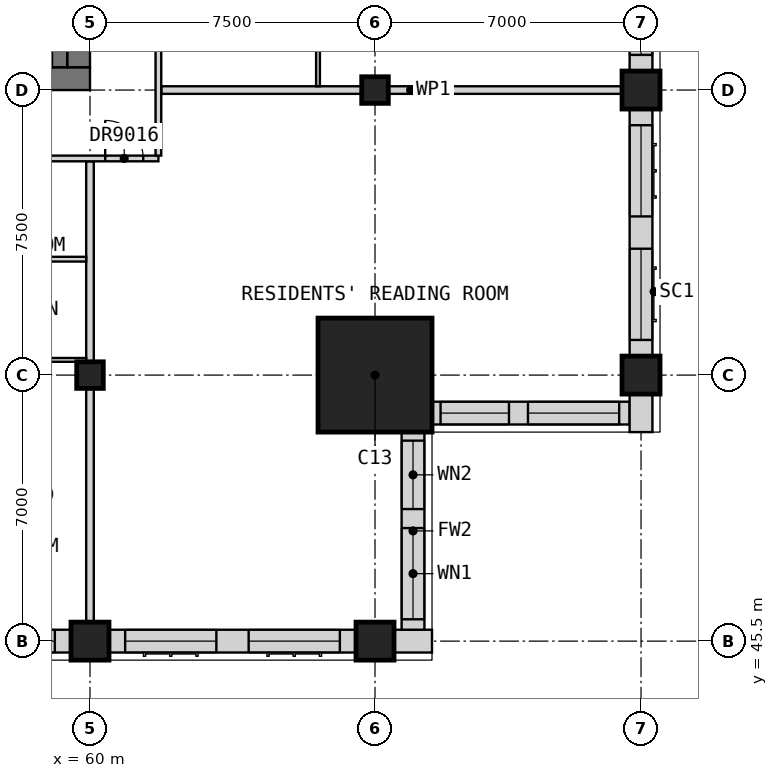
"""IFC4 building model, lengths in metres.
Left out: names, types, materials, properties, quantities, classifications, styles, units other than length and angle.
Written with IfcOpenShell. Run it as: python <this file> out.ifc"""

import sys

from ifc_helpers import new_model, si_unit, direction, frame, frame_2d, origin, origin_2d, place, context, subcontext, project, spatial, rectangle, extrude, element, fill, save


model = new_model("IFC4")
c1 = context("Model", 3, precision=1e-05, world=origin(), true_north=direction((0.0, 1.0)))
c2 = subcontext(c1, "Body", "Model", "MODEL_VIEW")
j1 = project(units=[si_unit("LENGTHUNIT", "METRE"), si_unit("PLANEANGLEUNIT", "RADIAN")], contexts=[c1])
p1 = place(None, origin())
s1 = spatial("IfcSite", under=j1, at=p1, CompositionType="ELEMENT")
p2 = place(p1, origin())
s2 = spatial("IfcBuilding", under=s1, at=p2, CompositionType="ELEMENT")
p3 = place(p2, frame((0.0, 0.0, 269.7)))
s3 = spatial("IfcBuildingStorey", under=s2, at=p3, CompositionType="ELEMENT", Elevation=269.7)
p4 = place(p3, frame((60.0, 45.5, 0.0), z_axis=(0.0, 0.0, 1.0), x_axis=(1.0, 0.0, 0.0)))
e1 = element("IfcColumn", 1, at=p4, inside=s3, PredefinedType="COLUMN", context=c2, shape_type="SweptSolid", body=[
    extrude(rectangle(XDim=1.0, YDim=1.0, at=origin_2d()), origin(), (0.0, 0.0, 1.0), 3.5),
])
p5 = place(p3, frame((60.0, 52.5, 0.0), z_axis=(0.0, 0.0, 1.0), x_axis=(1.0, 0.0, 0.0)))
e2 = element("IfcColumn", 2, at=p5, inside=s3, PredefinedType="COLUMN", context=c2, shape_type="SweptSolid", body=[
    extrude(rectangle(XDim=0.7, YDim=0.7, at=origin_2d()), origin(), (0.0, 0.0, 1.0), 3.5),
])
p6 = place(p3, frame((67.5, 45.5, 0.0), z_axis=(0.0, 0.0, 1.0), x_axis=(1.0, 0.0, 0.0)))
e3 = element("IfcColumn", 3, at=p6, inside=s3, PredefinedType="COLUMN", context=c2, shape_type="SweptSolid", body=[
    extrude(rectangle(XDim=1.0, YDim=1.0, at=origin_2d()), origin(), (0.0, 0.0, 1.0), 3.5),
])
p7 = place(p3, frame((67.5, 60.0, 0.0), z_axis=(0.0, 0.0, 1.0), x_axis=(1.0, 0.0, 0.0)))
e4 = element("IfcColumn", 4, at=p7, inside=s3, PredefinedType="COLUMN", context=c2, shape_type="SweptSolid", body=[
    extrude(rectangle(XDim=0.7, YDim=0.7, at=origin_2d()), origin(), (0.0, 0.0, 1.0), 3.5),
])
for number, where, z_axis, x_axis in (
    (5, (74.5, 52.5, 0.0), (0.0, 0.0, 1.0), (1.0, 0.0, 0.0)),
    (6, (74.5, 60.0, 0.0), (0.0, 0.0, 1.0), (1.0, 0.0, 0.0)),
):
    element("IfcColumn", number, at=place(p3, frame(where, z_axis=z_axis, x_axis=x_axis)), inside=s3, PredefinedType="COLUMN", context=c2, shape_type="SweptSolid", body=[
        extrude(rectangle(XDim=1.0, YDim=1.0, at=origin_2d()), origin(), (0.0, 0.0, 1.0), 3.5),
    ])
p8 = place(p3, frame((67.5, 52.5, 0.0), z_axis=(0.0, 0.0, 1.0), x_axis=(1.0, 0.0, 0.0)))
e7 = element("IfcColumn", 7, at=p8, inside=s3, PredefinedType="COLUMN", context=c2, shape_type="SweptSolid", body=[
    extrude(rectangle(XDim=3.0, YDim=3.0, at=origin_2d()), origin(), (0.0, 0.0, 1.0), 3.5),
])
p9 = place(p3, frame((30.0, 60.3, 0.0), z_axis=(0.0, 0.0, 1.0), x_axis=(1.0, 0.0, 0.0)))
e8 = element("IfcWall", 8, at=p9, inside=s3, PredefinedType="SHEAR", context=c2, shape_type="SweptSolid", body=[
    extrude(rectangle(XDim=30.0, YDim=0.6, at=frame_2d((15.0, 0.0))), origin(), (0.0, 0.0, 1.0), 3.5),
])
p10 = place(p9, frame((21.9, 0.0, 0.0)))
e9 = element("IfcOpeningElement", 9, at=p10, cuts=e8, PredefinedType="OPENING", context=c2, shape_type="SweptSolid", body=[
    extrude(rectangle(XDim=1.8, YDim=2.1, at=frame_2d((0.9, 1.05))), frame((0.0, 0.31, 0.0), z_axis=(0.0, -1.0, 0.0), x_axis=(1.0, 0.0, 0.0)), (0.0, 0.0, 1.0), 0.62),
])
p11 = place(p9, frame((26.5, 0.0, 0.0)))
e10 = element("IfcOpeningElement", 10, at=p11, cuts=e8, PredefinedType="OPENING", context=c2, shape_type="SweptSolid", body=[
    extrude(rectangle(XDim=1.2, YDim=2.1, at=frame_2d((0.6, 1.05))), frame((0.0, 0.31, 0.0), z_axis=(0.0, -1.0, 0.0), x_axis=(1.0, 0.0, 0.0)), (0.0, 0.0, 1.0), 0.62),
])
p12 = place(p3, frame((59.7, 60.6, 0.0), z_axis=(0.0, 0.0, 1.0), x_axis=(0.0, 1.0, 0.0)))
e11 = element("IfcWall", 11, at=p12, inside=s3, PredefinedType="SHEAR", context=c2, shape_type="SweptSolid", body=[
    extrude(rectangle(XDim=21.3, YDim=0.6, at=frame_2d((10.65, 0.0))), origin(), (0.0, 0.0, 1.0), 3.5),
])
p13 = place(p12, frame((14.9, 0.0, 0.0)))
e12 = element("IfcOpeningElement", 12, at=p13, cuts=e11, PredefinedType="OPENING", context=c2, shape_type="SweptSolid", body=[
    extrude(rectangle(XDim=1.8, YDim=2.1, at=frame_2d((0.9, 1.05))), frame((0.0, 0.31, 0.0), z_axis=(0.0, -1.0, 0.0), x_axis=(1.0, 0.0, 0.0)), (0.0, 0.0, 1.0), 0.62),
])
p14 = place(p3, frame((53.0, 45.5, 0.0), z_axis=(0.0, 0.0, 1.0), x_axis=(1.0, 0.0, 0.0)))
e13 = element("IfcWall", 13, at=p14, inside=s3, PredefinedType="SOLIDWALL", context=c2, shape_type="SweptSolid", body=[
    extrude(rectangle(XDim=6.5, YDim=0.6, at=frame_2d((3.25, 0.0))), origin(), (0.0, 0.0, 1.0), 2.75),
])
p15 = place(p14, frame((0.425, 0.0, 0.8)))
e14 = element("IfcOpeningElement", 14, at=p15, cuts=e13, PredefinedType="OPENING", context=c2, shape_type="SweptSolid", body=[
    extrude(rectangle(XDim=2.4, YDim=1.8, at=frame_2d((1.2, 0.9))), frame((0.0, 0.31, 0.0), z_axis=(0.0, -1.0, 0.0), x_axis=(1.0, 0.0, 0.0)), (0.0, 0.0, 1.0), 0.62),
])
p16 = place(p14, frame((3.675, 0.0, 0.8)))
e15 = element("IfcOpeningElement", 15, at=p16, cuts=e13, PredefinedType="OPENING", context=c2, shape_type="SweptSolid", body=[
    extrude(rectangle(XDim=2.4, YDim=1.8, at=frame_2d((1.2, 0.9))), frame((0.0, 0.31, 0.0), z_axis=(0.0, -1.0, 0.0), x_axis=(1.0, 0.0, 0.0)), (0.0, 0.0, 1.0), 0.62),
])
p17 = place(p3, frame((60.5, 45.5, 0.0), z_axis=(0.0, 0.0, 1.0), x_axis=(1.0, 0.0, 0.0)))
e16 = element("IfcWall", 16, at=p17, inside=s3, PredefinedType="SOLIDWALL", context=c2, shape_type="SweptSolid", body=[
    extrude(rectangle(XDim=6.5, YDim=0.6, at=frame_2d((3.25, 0.0))), origin(), (0.0, 0.0, 1.0), 2.75),
])
p18 = place(p17, frame((0.425, 0.0, 0.8)))
e17 = element("IfcOpeningElement", 17, at=p18, cuts=e16, PredefinedType="OPENING", context=c2, shape_type="SweptSolid", body=[
    extrude(rectangle(XDim=2.4, YDim=1.8, at=frame_2d((1.2, 0.9))), frame((0.0, 0.31, 0.0), z_axis=(0.0, -1.0, 0.0), x_axis=(1.0, 0.0, 0.0)), (0.0, 0.0, 1.0), 0.62),
])
p19 = place(p17, frame((3.675, 0.0, 0.8)))
e18 = element("IfcOpeningElement", 18, at=p19, cuts=e16, PredefinedType="OPENING", context=c2, shape_type="SweptSolid", body=[
    extrude(rectangle(XDim=2.4, YDim=1.8, at=frame_2d((1.2, 0.9))), frame((0.0, 0.31, 0.0), z_axis=(0.0, -1.0, 0.0), x_axis=(1.0, 0.0, 0.0)), (0.0, 0.0, 1.0), 0.62),
])
p20 = place(p3, frame((68.0, 45.5, 0.0), z_axis=(0.0, 0.0, 1.0), x_axis=(1.0, 0.0, 0.0)))
e19 = element("IfcWall", 19, at=p20, inside=s3, PredefinedType="SOLIDWALL", context=c2, shape_type="SweptSolid", body=[
    extrude(rectangle(XDim=1.0, YDim=0.6, at=frame_2d((0.5, 0.0))), origin(), (0.0, 0.0, 1.0), 3.25),
])
p21 = place(p3, frame((68.5, 45.8, 0.0), z_axis=(0.0, 0.0, 1.0), x_axis=(0.0, 1.0, 0.0)))
e20 = element("IfcWall", 20, at=p21, inside=s3, PredefinedType="SOLIDWALL", context=c2, shape_type="SweptSolid", body=[
    extrude(rectangle(XDim=5.2, YDim=0.6, at=frame_2d((2.6, 0.0))), origin(), (0.0, 0.0, 1.0), 3.25),
])
p22 = place(p21, frame((0.275, 0.0, 0.8)))
e21 = element("IfcOpeningElement", 21, at=p22, cuts=e20, PredefinedType="OPENING", context=c2, shape_type="SweptSolid", body=[
    extrude(rectangle(XDim=2.4, YDim=1.8, at=frame_2d((1.2, 0.9))), frame((0.0, 0.31, 0.0), z_axis=(0.0, -1.0, 0.0), x_axis=(1.0, 0.0, 0.0)), (0.0, 0.0, 1.0), 0.62),
])
p23 = place(p21, frame((3.175, 0.0, 0.8)))
e22 = element("IfcOpeningElement", 22, at=p23, cuts=e20, PredefinedType="OPENING", context=c2, shape_type="SweptSolid", body=[
    extrude(rectangle(XDim=1.8, YDim=1.8, at=frame_2d((0.9, 0.9))), frame((0.0, 0.31, 0.0), z_axis=(0.0, -1.0, 0.0), x_axis=(1.0, 0.0, 0.0)), (0.0, 0.0, 1.0), 0.62),
])
p24 = place(p3, frame((69.0, 51.5, 0.0), z_axis=(0.0, 0.0, 1.0), x_axis=(1.0, 0.0, 0.0)))
e23 = element("IfcWall", 23, at=p24, inside=s3, PredefinedType="SOLIDWALL", context=c2, shape_type="SweptSolid", body=[
    extrude(rectangle(XDim=5.2, YDim=0.6, at=frame_2d((2.6, 0.0))), origin(), (0.0, 0.0, 1.0), 3.25),
])
p25 = place(p24, frame((0.225, 0.0, 0.8)))
e24 = element("IfcOpeningElement", 24, at=p25, cuts=e23, PredefinedType="OPENING", context=c2, shape_type="SweptSolid", body=[
    extrude(rectangle(XDim=1.8, YDim=1.8, at=frame_2d((0.9, 0.9))), frame((0.0, 0.31, 0.0), z_axis=(0.0, -1.0, 0.0), x_axis=(1.0, 0.0, 0.0)), (0.0, 0.0, 1.0), 0.62),
])
p26 = place(p24, frame((2.525, 0.0, 0.8)))
e25 = element("IfcOpeningElement", 25, at=p26, cuts=e23, PredefinedType="OPENING", context=c2, shape_type="SweptSolid", body=[
    extrude(rectangle(XDim=2.4, YDim=1.8, at=frame_2d((1.2, 0.9))), frame((0.0, 0.31, 0.0), z_axis=(0.0, -1.0, 0.0), x_axis=(1.0, 0.0, 0.0)), (0.0, 0.0, 1.0), 0.62),
])
p27 = place(p3, frame((74.5, 51.0, 0.0), z_axis=(0.0, 0.0, 1.0), x_axis=(0.0, 1.0, 0.0)))
e26 = element("IfcWall", 26, at=p27, inside=s3, PredefinedType="SOLIDWALL", context=c2, shape_type="SweptSolid", body=[
    extrude(rectangle(XDim=1.0, YDim=0.6, at=frame_2d((0.5, 0.0))), origin(), (0.0, 0.0, 1.0), 3.25),
])
p28 = place(p3, frame((74.5, 53.0, 0.0), z_axis=(0.0, 0.0, 1.0), x_axis=(0.0, 1.0, 0.0)))
e27 = element("IfcWall", 27, at=p28, inside=s3, PredefinedType="SOLIDWALL", context=c2, shape_type="SweptSolid", body=[
    extrude(rectangle(XDim=6.5, YDim=0.6, at=frame_2d((3.25, 0.0))), origin(), (0.0, 0.0, 1.0), 2.75),
])
p29 = place(p28, frame((0.425, 0.0, 0.8)))
e28 = element("IfcOpeningElement", 28, at=p29, cuts=e27, PredefinedType="OPENING", context=c2, shape_type="SweptSolid", body=[
    extrude(rectangle(XDim=2.4, YDim=1.8, at=frame_2d((1.2, 0.9))), frame((0.0, 0.31, 0.0), z_axis=(0.0, -1.0, 0.0), x_axis=(1.0, 0.0, 0.0)), (0.0, 0.0, 1.0), 0.62),
])
p30 = place(p28, frame((3.675, 0.0, 0.8)))
e29 = element("IfcOpeningElement", 29, at=p30, cuts=e27, PredefinedType="OPENING", context=c2, shape_type="SweptSolid", body=[
    extrude(rectangle(XDim=2.4, YDim=1.8, at=frame_2d((1.2, 0.9))), frame((0.0, 0.31, 0.0), z_axis=(0.0, -1.0, 0.0), x_axis=(1.0, 0.0, 0.0)), (0.0, 0.0, 1.0), 0.62),
])
p31 = place(p3, frame((74.5, 60.5, 0.0), z_axis=(0.0, 0.0, 1.0), x_axis=(0.0, 1.0, 0.0)))
e30 = element("IfcWall", 30, at=p31, inside=s3, PredefinedType="SOLIDWALL", context=c2, shape_type="SweptSolid", body=[
    extrude(rectangle(XDim=6.5, YDim=0.6, at=frame_2d((3.25, 0.0))), origin(), (0.0, 0.0, 1.0), 2.75),
])
p32 = place(p31, frame((0.425, 0.0, 0.8)))
e31 = element("IfcOpeningElement", 31, at=p32, cuts=e30, PredefinedType="OPENING", context=c2, shape_type="SweptSolid", body=[
    extrude(rectangle(XDim=2.4, YDim=1.8, at=frame_2d((1.2, 0.9))), frame((0.0, 0.31, 0.0), z_axis=(0.0, -1.0, 0.0), x_axis=(1.0, 0.0, 0.0)), (0.0, 0.0, 1.0), 0.62),
])
p33 = place(p31, frame((3.675, 0.0, 0.8)))
e32 = element("IfcOpeningElement", 32, at=p33, cuts=e30, PredefinedType="OPENING", context=c2, shape_type="SweptSolid", body=[
    extrude(rectangle(XDim=2.4, YDim=1.8, at=frame_2d((1.2, 0.9))), frame((0.0, 0.31, 0.0), z_axis=(0.0, -1.0, 0.0), x_axis=(1.0, 0.0, 0.0)), (0.0, 0.0, 1.0), 0.62),
])
p34 = place(p3, frame((59.2, 60.6, 0.0), z_axis=(0.0, 0.0, 1.0), x_axis=(0.0, 1.0, 0.0)))
e33 = element("IfcWall", 33, at=p34, inside=s3, PredefinedType="SOLIDWALL", context=c2, shape_type="SweptSolid", body=[
    extrude(rectangle(XDim=7.9, YDim=0.4, at=frame_2d((3.95, 0.0))), origin(), (0.0, 0.0, 1.0), 3.25),
])
for number, where, z_axis, x_axis in (
    (34, (61.875, 60.0, 0.0), (0.0, 0.0, 1.0), (1.0, 0.0, 0.0)),
    (35, (60.0, 45.0, 0.0), (0.0, 0.0, 1.0), (0.0, 1.0, 0.0)),
):
    element("IfcWall", number, at=place(p3, frame(where, z_axis=z_axis, x_axis=x_axis)), inside=s3, PredefinedType="PARTITIONING", context=c2, shape_type="SweptSolid", body=[
        extrude(rectangle(XDim=13.125, YDim=0.2, at=frame_2d((6.562, 0.0))), origin(), (0.0, 0.0, 1.0), 3.25),
    ])
p35 = place(p3, frame((33.75, 58.2, 0.0), z_axis=(0.0, 0.0, 1.0), x_axis=(1.0, 0.0, 0.0)))
e36 = element("IfcWall", 36, at=p35, inside=s3, PredefinedType="PARTITIONING", context=c2, shape_type="SweptSolid", body=[
    extrude(rectangle(XDim=28.05, YDim=0.15, at=frame_2d((14.025, 0.0))), origin(), (0.0, 0.0, 1.0), 3.25),
])
p36 = place(p35, frame((3.25, 0.0, 0.0)))
e37 = element("IfcOpeningElement", 37, at=p36, cuts=e36, PredefinedType="OPENING", context=c2, shape_type="SweptSolid", body=[
    extrude(rectangle(XDim=1.0, YDim=2.1, at=frame_2d((0.5, 1.05))), frame((0.0, 0.085, 0.0), z_axis=(0.0, -1.0, 0.0), x_axis=(1.0, 0.0, 0.0)), (0.0, 0.0, 1.0), 0.17),
])
p37 = place(p35, frame((8.925, 0.0, 0.0)))
e38 = element("IfcOpeningElement", 38, at=p37, cuts=e36, PredefinedType="OPENING", context=c2, shape_type="SweptSolid", body=[
    extrude(rectangle(XDim=0.9, YDim=2.1, at=frame_2d((0.45, 1.05))), frame((0.0, 0.085, 0.0), z_axis=(0.0, -1.0, 0.0), x_axis=(1.0, 0.0, 0.0)), (0.0, 0.0, 1.0), 0.17),
])
p38 = place(p35, frame((20.175, 0.0, 0.0)))
e39 = element("IfcOpeningElement", 39, at=p38, cuts=e36, PredefinedType="OPENING", context=c2, shape_type="SweptSolid", body=[
    extrude(rectangle(XDim=0.9, YDim=2.1, at=frame_2d((0.45, 1.05))), frame((0.0, 0.085, 0.0), z_axis=(0.0, -1.0, 0.0), x_axis=(1.0, 0.0, 0.0)), (0.0, 0.0, 1.0), 0.17),
])
p39 = place(p35, frame((26.65, 0.0, 0.0)))
e40 = element("IfcOpeningElement", 40, at=p39, cuts=e36, PredefinedType="OPENING", context=c2, shape_type="SweptSolid", body=[
    extrude(rectangle(XDim=1.0, YDim=2.1, at=frame_2d((0.5, 1.05))), frame((0.0, 0.085, 0.0), z_axis=(0.0, -1.0, 0.0), x_axis=(1.0, 0.0, 0.0)), (0.0, 0.0, 1.0), 0.17),
])
p40 = place(p3, frame((61.8, 58.275, 0.0), z_axis=(0.0, 0.0, 1.0), x_axis=(0.0, 1.0, 0.0)))
e41 = element("IfcWall", 41, at=p40, inside=s3, PredefinedType="PARTITIONING", context=c2, shape_type="SweptSolid", body=[
    extrude(rectangle(XDim=25.95, YDim=0.15, at=frame_2d((12.975, 0.0))), origin(), (0.0, 0.0, 1.0), 3.25),
])
p41 = place(p40, frame((3.15, 0.0, 0.0)))
e42 = element("IfcOpeningElement", 42, at=p41, cuts=e41, PredefinedType="OPENING", context=c2, shape_type="SweptSolid", body=[
    extrude(rectangle(XDim=0.9, YDim=2.1, at=frame_2d((0.45, 1.05))), frame((0.0, 0.085, 0.0), z_axis=(0.0, -1.0, 0.0), x_axis=(1.0, 0.0, 0.0)), (0.0, 0.0, 1.0), 0.17),
])
p42 = place(p40, frame((18.15, 0.0, 0.0)))
e43 = element("IfcOpeningElement", 43, at=p42, cuts=e41, PredefinedType="OPENING", context=c2, shape_type="SweptSolid", body=[
    extrude(rectangle(XDim=0.9, YDim=2.1, at=frame_2d((0.45, 1.05))), frame((0.0, 0.085, 0.0), z_axis=(0.0, -1.0, 0.0), x_axis=(1.0, 0.0, 0.0)), (0.0, 0.0, 1.0), 0.17),
])
p43 = place(p3, frame((41.35, 52.9, 0.0), z_axis=(0.0, 0.0, 1.0), x_axis=(1.0, 0.0, 0.0)))
e44 = element("IfcWall", 44, at=p43, inside=s3, PredefinedType="PARTITIONING", context=c2, shape_type="SweptSolid", body=[
    extrude(rectangle(XDim=18.55, YDim=0.1, at=frame_2d((9.275, 0.0))), origin(), (0.0, 0.0, 1.0), 3.25),
])
p44 = place(p43, frame((1.325, 0.0, 0.0)))
e45 = element("IfcOpeningElement", 45, at=p44, cuts=e44, PredefinedType="OPENING", context=c2, shape_type="SweptSolid", body=[
    extrude(rectangle(XDim=0.9, YDim=2.1, at=frame_2d((0.45, 1.05))), frame((0.0, 0.06, 0.0), z_axis=(0.0, -1.0, 0.0), x_axis=(1.0, 0.0, 0.0)), (0.0, 0.0, 1.0), 0.12),
])
p45 = place(p43, frame((8.825, 0.0, 0.0)))
e46 = element("IfcOpeningElement", 46, at=p45, cuts=e44, PredefinedType="OPENING", context=c2, shape_type="SweptSolid", body=[
    extrude(rectangle(XDim=0.9, YDim=2.1, at=frame_2d((0.45, 1.05))), frame((0.0, 0.06, 0.0), z_axis=(0.0, -1.0, 0.0), x_axis=(1.0, 0.0, 0.0)), (0.0, 0.0, 1.0), 0.12),
])
p46 = place(p43, frame((12.575, 0.0, 0.0)))
e47 = element("IfcOpeningElement", 47, at=p46, cuts=e44, PredefinedType="OPENING", context=c2, shape_type="SweptSolid", body=[
    extrude(rectangle(XDim=0.9, YDim=2.1, at=frame_2d((0.45, 1.05))), frame((0.0, 0.06, 0.0), z_axis=(0.0, -1.0, 0.0), x_axis=(1.0, 0.0, 0.0)), (0.0, 0.0, 1.0), 0.12),
])
p47 = place(p3, frame((66.0, 60.1, 0.0), z_axis=(0.0, 0.0, 1.0), x_axis=(0.0, 1.0, 0.0)))
e48 = element("IfcWall", 48, at=p47, inside=s3, PredefinedType="PARTITIONING", context=c2, shape_type="SweptSolid", body=[
    extrude(rectangle(XDim=22.3, YDim=0.1, at=frame_2d((11.15, 0.0))), origin(), (0.0, 0.0, 1.0), 3.25),
])
p48 = place(p47, frame((1.325, 0.0, 0.0)))
e49 = element("IfcOpeningElement", 49, at=p48, cuts=e48, PredefinedType="OPENING", context=c2, shape_type="SweptSolid", body=[
    extrude(rectangle(XDim=0.9, YDim=2.1, at=frame_2d((0.45, 1.05))), frame((0.0, 0.06, 0.0), z_axis=(0.0, -1.0, 0.0), x_axis=(1.0, 0.0, 0.0)), (0.0, 0.0, 1.0), 0.12),
])
p49 = place(p47, frame((8.825, 0.0, 0.0)))
e50 = element("IfcOpeningElement", 50, at=p49, cuts=e48, PredefinedType="OPENING", context=c2, shape_type="SweptSolid", body=[
    extrude(rectangle(XDim=0.9, YDim=2.1, at=frame_2d((0.45, 1.05))), frame((0.0, 0.06, 0.0), z_axis=(0.0, -1.0, 0.0), x_axis=(1.0, 0.0, 0.0)), (0.0, 0.0, 1.0), 0.12),
])
p50 = place(p47, frame((12.575, 0.0, 0.0)))
e51 = element("IfcOpeningElement", 51, at=p50, cuts=e48, PredefinedType="OPENING", context=c2, shape_type="SweptSolid", body=[
    extrude(rectangle(XDim=0.9, YDim=2.1, at=frame_2d((0.45, 1.05))), frame((0.0, 0.06, 0.0), z_axis=(0.0, -1.0, 0.0), x_axis=(1.0, 0.0, 0.0)), (0.0, 0.0, 1.0), 0.12),
])
p51 = place(p47, frame((16.325, 0.0, 0.0)))
e52 = element("IfcOpeningElement", 52, at=p51, cuts=e48, PredefinedType="OPENING", context=c2, shape_type="SweptSolid", body=[
    extrude(rectangle(XDim=0.9, YDim=2.1, at=frame_2d((0.45, 1.05))), frame((0.0, 0.06, 0.0), z_axis=(0.0, -1.0, 0.0), x_axis=(1.0, 0.0, 0.0)), (0.0, 0.0, 1.0), 0.12),
])
p52 = place(p3, frame((56.25, 55.55, 0.0), z_axis=(0.0, 0.0, 1.0), x_axis=(1.0, 0.0, 0.0)))
e53 = element("IfcWall", 53, at=p52, inside=s3, PredefinedType="PARTITIONING", context=c2, shape_type="SweptSolid", body=[
    extrude(rectangle(XDim=3.65, YDim=0.125, at=frame_2d((1.825, 0.0))), origin(), (0.0, 0.0, 1.0), 3.25),
])
p53 = place(p16, origin())
e54 = element("IfcWindow", 54, at=p53, inside=s3, PartitioningType="SINGLE_PANEL", PredefinedType="WINDOW", context=c2, shape_type="SweptSolid", body=[
    extrude(rectangle(XDim=2.4, YDim=1.8, at=frame_2d((1.2, 0.9))), frame((0.0, -0.07, 0.0), z_axis=(0.0, -1.0, 0.0), x_axis=(1.0, 0.0, 0.0)), (0.0, 0.0, 1.0), 0.06),
])
fill(e15, e54)
p54 = place(p18, origin())
e55 = element("IfcWindow", 55, at=p54, inside=s3, PartitioningType="SINGLE_PANEL", PredefinedType="WINDOW", context=c2, shape_type="SweptSolid", body=[
    extrude(rectangle(XDim=2.4, YDim=1.8, at=frame_2d((1.2, 0.9))), frame((0.0, -0.07, 0.0), z_axis=(0.0, -1.0, 0.0), x_axis=(1.0, 0.0, 0.0)), (0.0, 0.0, 1.0), 0.06),
])
fill(e17, e55)
p55 = place(p19, origin())
e56 = element("IfcWindow", 56, at=p55, inside=s3, PartitioningType="SINGLE_PANEL", PredefinedType="WINDOW", context=c2, shape_type="SweptSolid", body=[
    extrude(rectangle(XDim=2.4, YDim=1.8, at=frame_2d((1.2, 0.9))), frame((0.0, -0.07, 0.0), z_axis=(0.0, -1.0, 0.0), x_axis=(1.0, 0.0, 0.0)), (0.0, 0.0, 1.0), 0.06),
])
fill(e18, e56)
p56 = place(p22, origin())
e57 = element("IfcWindow", 57, at=p56, inside=s3, PartitioningType="SINGLE_PANEL", PredefinedType="WINDOW", context=c2, shape_type="SweptSolid", body=[
    extrude(rectangle(XDim=2.4, YDim=1.8, at=frame_2d((1.2, 0.9))), frame((0.0, -0.07, 0.0), z_axis=(0.0, -1.0, 0.0), x_axis=(1.0, 0.0, 0.0)), (0.0, 0.0, 1.0), 0.06),
])
fill(e21, e57)
p57 = place(p23, origin())
e58 = element("IfcWindow", 58, at=p57, inside=s3, PartitioningType="SINGLE_PANEL", PredefinedType="WINDOW", context=c2, shape_type="SweptSolid", body=[
    extrude(rectangle(XDim=1.8, YDim=1.8, at=frame_2d((0.9, 0.9))), frame((0.0, -0.07, 0.0), z_axis=(0.0, -1.0, 0.0), x_axis=(1.0, 0.0, 0.0)), (0.0, 0.0, 1.0), 0.06),
])
fill(e22, e58)
p58 = place(p25, origin())
e59 = element("IfcWindow", 59, at=p58, inside=s3, PartitioningType="SINGLE_PANEL", PredefinedType="WINDOW", context=c2, shape_type="SweptSolid", body=[
    extrude(rectangle(XDim=1.8, YDim=1.8, at=frame_2d((0.9, 0.9))), frame((0.0, -0.07, 0.0), z_axis=(0.0, -1.0, 0.0), x_axis=(1.0, 0.0, 0.0)), (0.0, 0.0, 1.0), 0.06),
])
fill(e24, e59)
p59 = place(p26, origin())
e60 = element("IfcWindow", 60, at=p59, inside=s3, PartitioningType="SINGLE_PANEL", PredefinedType="WINDOW", context=c2, shape_type="SweptSolid", body=[
    extrude(rectangle(XDim=2.4, YDim=1.8, at=frame_2d((1.2, 0.9))), frame((0.0, -0.07, 0.0), z_axis=(0.0, -1.0, 0.0), x_axis=(1.0, 0.0, 0.0)), (0.0, 0.0, 1.0), 0.06),
])
fill(e25, e60)
p60 = place(p29, origin())
e61 = element("IfcWindow", 61, at=p60, inside=s3, PartitioningType="SINGLE_PANEL", PredefinedType="WINDOW", context=c2, shape_type="SweptSolid", body=[
    extrude(rectangle(XDim=2.4, YDim=1.8, at=frame_2d((1.2, 0.9))), frame((0.0, -0.07, 0.0), z_axis=(0.0, -1.0, 0.0), x_axis=(1.0, 0.0, 0.0)), (0.0, 0.0, 1.0), 0.06),
])
fill(e28, e61)
p61 = place(p30, origin())
e62 = element("IfcWindow", 62, at=p61, inside=s3, PartitioningType="SINGLE_PANEL", PredefinedType="WINDOW", context=c2, shape_type="SweptSolid", body=[
    extrude(rectangle(XDim=2.4, YDim=1.8, at=frame_2d((1.2, 0.9))), frame((0.0, -0.07, 0.0), z_axis=(0.0, -1.0, 0.0), x_axis=(1.0, 0.0, 0.0)), (0.0, 0.0, 1.0), 0.06),
])
fill(e29, e62)
p62 = place(p32, origin())
e63 = element("IfcWindow", 63, at=p62, inside=s3, PartitioningType="SINGLE_PANEL", PredefinedType="WINDOW", context=c2, shape_type="SweptSolid", body=[
    extrude(rectangle(XDim=2.4, YDim=1.8, at=frame_2d((1.2, 0.9))), frame((0.0, -0.07, 0.0), z_axis=(0.0, -1.0, 0.0), x_axis=(1.0, 0.0, 0.0)), (0.0, 0.0, 1.0), 0.06),
])
fill(e31, e63)
p63 = place(p39, origin())
e64 = element("IfcDoor", 64, at=p63, inside=s3, OperationType="SINGLE_SWING_RIGHT", PredefinedType="DOOR", context=c2, shape_type="SweptSolid", body=[
    extrude(rectangle(XDim=1.0, YDim=2.1, at=frame_2d((0.5, 1.05))), frame((0.0, 0.025, 0.0), z_axis=(0.0, -1.0, 0.0), x_axis=(1.0, 0.0, 0.0)), (0.0, 0.0, 1.0), 0.05),
])
fill(e40, e64)
save(model, sys.argv[1])
